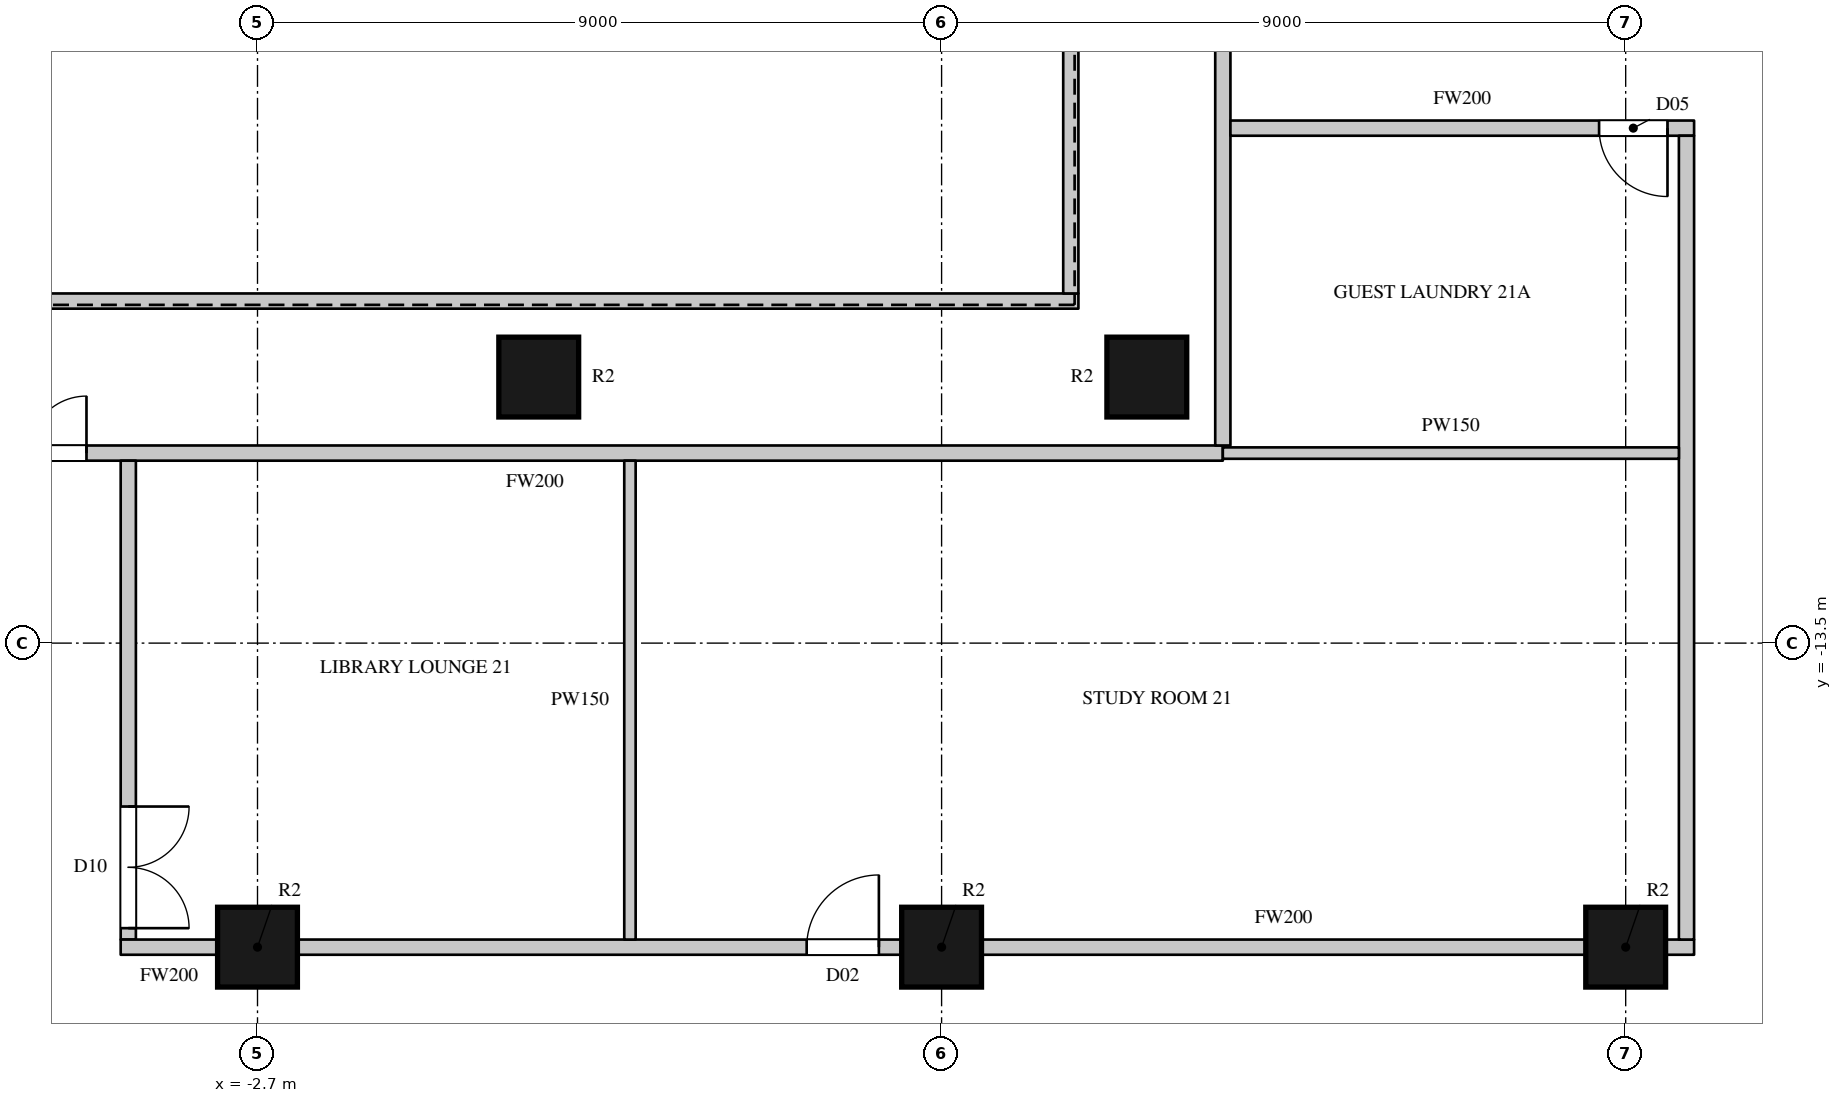
"""IFC4 building model, lengths in metres.
Left out: names, types, materials, properties, quantities, classifications, styles, units other than length and angle.
Written with IfcOpenShell. Run it as: python <this file> out.ifc"""

import sys

from ifc_helpers import new_model, si_unit, direction, frame, frame_2d, origin, origin_2d, place, context, subcontext, project, spatial, rectangle, circle, extrude, element, fill, save


model = new_model("IFC4")
c1 = context("Model", 3, precision=1e-05, world=origin(), true_north=direction((0.0, 1.0)))
c2 = subcontext(c1, "Body", "Model", "MODEL_VIEW")
j1 = project(units=[si_unit("LENGTHUNIT", "METRE"), si_unit("PLANEANGLEUNIT", "RADIAN")], contexts=[c1])
p1 = place(None, origin())
s1 = spatial("IfcSite", under=j1, at=p1, CompositionType="ELEMENT")
p2 = place(p1, origin())
s2 = spatial("IfcBuilding", under=s1, at=p2, CompositionType="ELEMENT")
p3 = place(p2, frame((0.0, 0.0, 105.9)))
s3 = spatial("IfcBuildingStorey", under=s2, at=p3, CompositionType="ELEMENT", Elevation=105.9)
for number, where, z_axis, x_axis in (
    (1, (-2.7, -17.5, 0.0), (0.0, 0.0, 1.0), (1.0, 0.0, 0.0)),
    (2, (6.3, -17.5, 0.0), (0.0, 0.0, 1.0), (1.0, 0.0, 0.0)),
    (3, (15.3, -17.5, 0.0), (0.0, 0.0, 1.0), (1.0, 0.0, 0.0)),
    (4, (1.0, -10.0, 0.0), (0.0, 0.0, 1.0), (1.0, 0.0, 0.0)),
    (5, (9.0, -10.0, 0.0), (0.0, 0.0, 1.0), (1.0, 0.0, 0.0)),
):
    element("IfcColumn", number, at=place(p3, frame(where, z_axis=z_axis, x_axis=x_axis)), inside=s3, PredefinedType="COLUMN", context=c2, shape_type="SweptSolid", body=[
        extrude(circle(Radius=0.525, at=origin_2d()), origin(), (0.0, 0.0, 1.0), 3.6),
    ])
p4 = place(p3, frame((-8.1, -11.0, 0.0), z_axis=(0.0, 0.0, 1.0), x_axis=(1.0, 0.0, 0.0)))
e6 = element("IfcWall", 6, at=p4, inside=s3, PredefinedType="PARTITIONING", context=c2, shape_type="SweptSolid", body=[
    extrude(rectangle(XDim=18.1, YDim=0.2, at=frame_2d((9.05, 0.0))), origin(), (0.0, 0.0, 1.0), 3.3),
])
p5 = place(p4, frame((1.65, 0.0, 0.0)))
e7 = element("IfcOpeningElement", 7, at=p5, cuts=e6, PredefinedType="OPENING", context=c2, shape_type="SweptSolid", body=[
    extrude(rectangle(XDim=1.5, YDim=2.2, at=frame_2d((0.75, 1.1))), frame((0.0, 0.11, 0.0), z_axis=(0.0, -1.0, 0.0), x_axis=(1.0, 0.0, 0.0)), (0.0, 0.0, 1.0), 0.22),
])
p6 = place(p3, frame((-6.1, -9.0, 0.0), z_axis=(0.0, 0.0, 1.0), x_axis=(1.0, 0.0, 0.0)))
e8 = element("IfcWall", 8, at=p6, inside=s3, PredefinedType="PARTITIONING", context=c2, shape_type="SweptSolid", body=[
    extrude(rectangle(XDim=14.2, YDim=0.2, at=frame_2d((7.1, 0.0))), origin(), (0.0, 0.0, 1.0), 3.3),
])
p7 = place(p3, frame((-4.4, -17.4, 0.0), z_axis=(0.0, 0.0, 1.0), x_axis=(0.0, 1.0, 0.0)))
e9 = element("IfcWall", 9, at=p7, inside=s3, PredefinedType="PARTITIONING", context=c2, shape_type="SweptSolid", body=[
    extrude(rectangle(XDim=6.3, YDim=0.2, at=frame_2d((3.15, 0.0))), origin(), (0.0, 0.0, 1.0), 3.3),
])
p8 = place(p7, frame((0.15, 0.0, 0.0)))
e10 = element("IfcOpeningElement", 10, at=p8, cuts=e9, PredefinedType="OPENING", context=c2, shape_type="SweptSolid", body=[
    extrude(rectangle(XDim=1.6, YDim=2.4, at=frame_2d((0.8, 1.2))), frame((0.0, 0.11, 0.0), z_axis=(0.0, -1.0, 0.0), x_axis=(1.0, 0.0, 0.0)), (0.0, 0.0, 1.0), 0.22),
])
p9 = place(p3, frame((-4.5, -17.5, 0.0), z_axis=(0.0, 0.0, 1.0), x_axis=(1.0, 0.0, 0.0)))
e11 = element("IfcWall", 11, at=p9, inside=s3, PredefinedType="PARTITIONING", context=c2, shape_type="SweptSolid", body=[
    extrude(rectangle(XDim=1.275, YDim=0.2, at=frame_2d((0.637, 0.0))), origin(), (0.0, 0.0, 1.0), 2.75),
])
p10 = place(p3, frame((-2.175, -17.5, 0.0), z_axis=(0.0, 0.0, 1.0), x_axis=(1.0, 0.0, 0.0)))
e12 = element("IfcWall", 12, at=p10, inside=s3, PredefinedType="PARTITIONING", context=c2, shape_type="SweptSolid", body=[
    extrude(rectangle(XDim=7.95, YDim=0.2, at=frame_2d((3.975, 0.0))), origin(), (0.0, 0.0, 1.0), 2.75),
])
p11 = place(p10, frame((6.7, 0.0, 0.0)))
e13 = element("IfcOpeningElement", 13, at=p11, cuts=e12, PredefinedType="OPENING", context=c2, shape_type="SweptSolid", body=[
    extrude(rectangle(XDim=0.95, YDim=2.2, at=frame_2d((0.475, 1.1))), frame((0.0, 0.11, 0.0), z_axis=(0.0, -1.0, 0.0), x_axis=(1.0, 0.0, 0.0)), (0.0, 0.0, 1.0), 0.22),
])
p12 = place(p3, frame((6.825, -17.5, 0.0), z_axis=(0.0, 0.0, 1.0), x_axis=(1.0, 0.0, 0.0)))
e14 = element("IfcWall", 14, at=p12, inside=s3, PredefinedType="PARTITIONING", context=c2, shape_type="SweptSolid", body=[
    extrude(rectangle(XDim=7.95, YDim=0.2, at=frame_2d((3.975, 0.0))), origin(), (0.0, 0.0, 1.0), 2.75),
])
p13 = place(p3, frame((15.825, -17.5, 0.0), z_axis=(0.0, 0.0, 1.0), x_axis=(1.0, 0.0, 0.0)))
e15 = element("IfcWall", 15, at=p13, inside=s3, PredefinedType="PARTITIONING", context=c2, shape_type="SweptSolid", body=[
    extrude(rectangle(XDim=0.375, YDim=0.2, at=frame_2d((0.188, 0.0))), origin(), (0.0, 0.0, 1.0), 3.3),
])
p14 = place(p3, frame((8.0, -8.9, 0.0), z_axis=(0.0, 0.0, 1.0), x_axis=(0.0, 1.0, 0.0)))
e16 = element("IfcWall", 16, at=p14, inside=s3, PredefinedType="PARTITIONING", context=c2, shape_type="SweptSolid", body=[
    extrude(rectangle(XDim=17.8, YDim=0.2, at=frame_2d((8.9, 0.0))), origin(), (0.0, 0.0, 1.0), 3.3),
])
p15 = place(p3, frame((10.0, -10.9, 0.0), z_axis=(0.0, 0.0, 1.0), x_axis=(0.0, 1.0, 0.0)))
e17 = element("IfcWall", 17, at=p15, inside=s3, PredefinedType="PARTITIONING", context=c2, shape_type="SweptSolid", body=[
    extrude(rectangle(XDim=21.8, YDim=0.2, at=frame_2d((10.9, 0.0))), origin(), (0.0, 0.0, 1.0), 3.3),
])
p16 = place(p15, frame((15.9, 0.0, 0.0)))
e18 = element("IfcOpeningElement", 18, at=p16, cuts=e17, PredefinedType="OPENING", context=c2, shape_type="SweptSolid", body=[
    extrude(rectangle(XDim=1.5, YDim=2.2, at=frame_2d((0.75, 1.1))), frame((0.0, 0.11, 0.0), z_axis=(0.0, -1.0, 0.0), x_axis=(1.0, 0.0, 0.0)), (0.0, 0.0, 1.0), 0.22),
])
p17 = place(p15, frame((11.55, 0.0, 0.0)))
e19 = element("IfcOpeningElement", 19, at=p17, cuts=e17, PredefinedType="OPENING", context=c2, shape_type="SweptSolid", body=[
    extrude(rectangle(XDim=1.5, YDim=2.2, at=frame_2d((0.75, 1.1))), frame((0.0, 0.11, 0.0), z_axis=(0.0, -1.0, 0.0), x_axis=(1.0, 0.0, 0.0)), (0.0, 0.0, 1.0), 0.22),
])
p18 = place(p3, frame((10.1, -6.725, 0.0), z_axis=(0.0, 0.0, 1.0), x_axis=(1.0, 0.0, 0.0)))
e20 = element("IfcWall", 20, at=p18, inside=s3, PredefinedType="PARTITIONING", context=c2, shape_type="SweptSolid", body=[
    extrude(rectangle(XDim=6.1, YDim=0.2, at=frame_2d((3.05, 0.0))), origin(), (0.0, 0.0, 1.0), 3.3),
])
p19 = place(p18, frame((4.85, 0.0, 0.0)))
e21 = element("IfcOpeningElement", 21, at=p19, cuts=e20, PredefinedType="OPENING", context=c2, shape_type="SweptSolid", body=[
    extrude(rectangle(XDim=0.9, YDim=2.2, at=frame_2d((0.45, 1.1))), frame((0.0, 0.11, 0.0), z_axis=(0.0, -1.0, 0.0), x_axis=(1.0, 0.0, 0.0)), (0.0, 0.0, 1.0), 0.22),
])
p20 = place(p3, frame((16.1, -17.4, 0.0), z_axis=(0.0, 0.0, 1.0), x_axis=(0.0, 1.0, 0.0)))
e22 = element("IfcWall", 22, at=p20, inside=s3, PredefinedType="PARTITIONING", context=c2, shape_type="SweptSolid", body=[
    extrude(rectangle(XDim=10.575, YDim=0.2, at=frame_2d((5.288, 0.0))), origin(), (0.0, 0.0, 1.0), 3.3),
])
p21 = place(p3, frame((2.2, -17.4, 0.0), z_axis=(0.0, 0.0, 1.0), x_axis=(0.0, 1.0, 0.0)))
e23 = element("IfcWall", 23, at=p21, inside=s3, PredefinedType="PARTITIONING", context=c2, shape_type="SweptSolid", body=[
    extrude(rectangle(XDim=6.3, YDim=0.15, at=frame_2d((3.15, 0.0))), origin(), (0.0, 0.0, 1.0), 3.3),
])
p22 = place(p3, frame((10.0, -11.0, 0.0), z_axis=(0.0, 0.0, 1.0), x_axis=(1.0, 0.0, 0.0)))
e24 = element("IfcWall", 24, at=p22, inside=s3, PredefinedType="PARTITIONING", context=c2, shape_type="SweptSolid", body=[
    extrude(rectangle(XDim=6.0, YDim=0.15, at=frame_2d((3.0, 0.0))), origin(), (0.0, 0.0, 1.0), 3.3),
])
p23 = place(p5, origin())
e25 = element("IfcDoor", 25, at=p23, inside=s3, OperationType="DOUBLE_DOOR_SINGLE_SWING", PredefinedType="DOOR", context=c2, shape_type="SweptSolid", body=[
    extrude(rectangle(XDim=1.5, YDim=2.2, at=frame_2d((0.75, 1.1))), frame((0.0, 0.025, 0.0), z_axis=(0.0, -1.0, 0.0), x_axis=(1.0, 0.0, 0.0)), (0.0, 0.0, 1.0), 0.05),
])
fill(e7, e25)
p24 = place(p8, origin())
e26 = element("IfcDoor", 26, at=p24, inside=s3, OperationType="DOUBLE_DOOR_SINGLE_SWING", PredefinedType="DOOR", context=c2, shape_type="SweptSolid", body=[
    extrude(rectangle(XDim=1.6, YDim=2.4, at=frame_2d((0.8, 1.2))), frame((0.0, 0.025, 0.0), z_axis=(0.0, -1.0, 0.0), x_axis=(1.0, 0.0, 0.0)), (0.0, 0.0, 1.0), 0.05),
])
fill(e10, e26)
p25 = place(p11, origin())
e27 = element("IfcDoor", 27, at=p25, inside=s3, OperationType="SINGLE_SWING_RIGHT", PredefinedType="DOOR", context=c2, shape_type="SweptSolid", body=[
    extrude(rectangle(XDim=0.95, YDim=2.2, at=frame_2d((0.475, 1.1))), frame((0.0, 0.025, 0.0), z_axis=(0.0, -1.0, 0.0), x_axis=(1.0, 0.0, 0.0)), (0.0, 0.0, 1.0), 0.05),
])
fill(e13, e27)
p26 = place(p19, origin())
e28 = element("IfcDoor", 28, at=p26, inside=s3, OperationType="SINGLE_SWING_LEFT", PredefinedType="DOOR", context=c2, shape_type="SweptSolid", body=[
    extrude(rectangle(XDim=0.9, YDim=2.2, at=frame_2d((0.45, 1.1))), frame((0.0, 0.025, 0.0), z_axis=(0.0, -1.0, 0.0), x_axis=(1.0, 0.0, 0.0)), (0.0, 0.0, 1.0), 0.05),
])
fill(e21, e28)
save(model, sys.argv[1])
